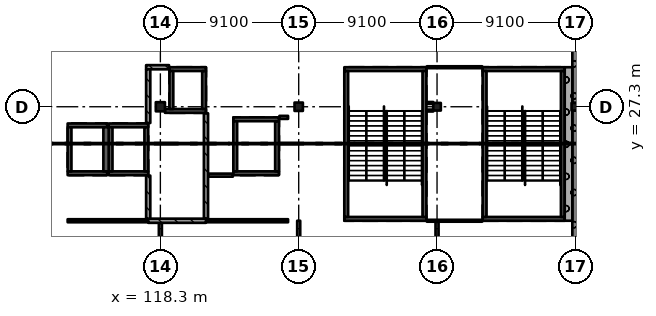
"""IFC4 building model, lengths in metres.
Left out: names, types, materials, properties, quantities, classifications, styles, units other than length and angle.
Written with IfcOpenShell. Run it as: python <this file> out.ifc"""

import sys

from ifc_helpers import new_model, si_unit, direction, frame, frame_2d, origin, origin_2d, place, context, subcontext, project, spatial, rectangle, extrude, element, fill, save


model = new_model("IFC4")
c1 = context("Model", 3, precision=1e-05, world=origin(), true_north=direction((0.0, 1.0)))
c2 = subcontext(c1, "Body", "Model", "MODEL_VIEW")
j1 = project(units=[si_unit("LENGTHUNIT", "METRE"), si_unit("PLANEANGLEUNIT", "RADIAN")], contexts=[c1])
p1 = place(None, origin())
s1 = spatial("IfcSite", under=j1, at=p1, CompositionType="ELEMENT")
p2 = place(p1, origin())
s2 = spatial("IfcBuilding", under=s1, at=p2, CompositionType="ELEMENT")
p3 = place(p2, frame((0.0, 0.0, 20.02)))
s3 = spatial("IfcBuildingStorey", under=s2, at=p3, CompositionType="ELEMENT", Elevation=20.02)
p4 = place(p3, frame((118.3, 27.3, 0.0), z_axis=(0.0, 0.0, 1.0), x_axis=(1.0, 0.0, 0.0)))
e1 = element("IfcColumn", 1, at=p4, inside=s3, PredefinedType="COLUMN", context=c2, shape_type="SweptSolid", body=[
    extrude(rectangle(XDim=0.6, YDim=0.6, at=origin_2d()), origin(), (0.0, 0.0, 1.0), 4.55),
])
p5 = place(p3, frame((127.4, 27.3, 0.0), z_axis=(0.0, 0.0, 1.0), x_axis=(1.0, 0.0, 0.0)))
e2 = element("IfcColumn", 2, at=p5, inside=s3, PredefinedType="COLUMN", context=c2, shape_type="SweptSolid", body=[
    extrude(rectangle(XDim=0.55, YDim=0.55, at=origin_2d()), origin(), (0.0, 0.0, 1.0), 4.55),
])
for number, where, z_axis, x_axis in (
    (3, (136.5, 27.3, 0.0), (0.0, 0.0, 1.0), (1.0, 0.0, 0.0)),
    (4, (145.6, 27.3, 0.0), (0.0, 0.0, 1.0), (1.0, 0.0, 0.0)),
):
    element("IfcColumn", number, at=place(p3, frame(where, z_axis=z_axis, x_axis=x_axis)), inside=s3, PredefinedType="COLUMN", context=c2, shape_type="SweptSolid", body=[
        extrude(rectangle(XDim=0.5, YDim=0.5, at=origin_2d()), origin(), (0.0, 0.0, 1.0), 4.55),
    ])
p6 = place(p3, frame((117.5, 22.925, 0.0), z_axis=(0.0, 0.0, 1.0), x_axis=(-1.0, 0.0, 0.0)))
e5 = element("IfcWall", 5, at=p6, inside=s3, PredefinedType="SHEAR", context=c2, shape_type="SweptSolid", body=[
    extrude(rectangle(XDim=2.6, YDim=0.25, at=frame_2d((1.3, 0.0))), origin(), (0.0, 0.0, 1.0), 4.55),
])
p7 = place(p6, frame((0.8, 0.0, 0.0)))
e6 = element("IfcOpeningElement", 6, at=p7, cuts=e5, PredefinedType="OPENING", context=c2, shape_type="SweptSolid", body=[
    extrude(rectangle(XDim=1.0, YDim=2.1, at=frame_2d((0.5, 1.05))), frame((0.0, 0.135, 0.0), z_axis=(0.0, -1.0, 0.0), x_axis=(1.0, 0.0, 0.0)), (0.0, 0.0, 1.0), 0.27),
])
p8 = place(p3, frame((117.5, 26.075, 0.0), z_axis=(0.0, 0.0, 1.0), x_axis=(-1.0, 0.0, 0.0)))
e7 = element("IfcWall", 7, at=p8, inside=s3, PredefinedType="SHEAR", context=c2, shape_type="SweptSolid", body=[
    extrude(rectangle(XDim=2.6, YDim=0.25, at=frame_2d((1.3, 0.0))), origin(), (0.0, 0.0, 1.0), 4.55),
])
for number, where, z_axis, x_axis in (
    (8, (115.025, 25.95, 0.0), (0.0, 0.0, 1.0), (0.0, -1.0, 0.0)),
    (9, (117.375, 25.95, 0.0), (0.0, 0.0, 1.0), (0.0, -1.0, 0.0)),
):
    element("IfcWall", number, at=place(p3, frame(where, z_axis=z_axis, x_axis=x_axis)), inside=s3, PredefinedType="SHEAR", context=c2, shape_type="SweptSolid", body=[
        extrude(rectangle(XDim=2.9, YDim=0.25, at=frame_2d((1.45, 0.0))), origin(), (0.0, 0.0, 1.0), 4.55),
    ])
p9 = place(p3, frame((114.8, 22.925, 0.0), z_axis=(0.0, 0.0, 1.0), x_axis=(-1.0, 0.0, 0.0)))
e10 = element("IfcWall", 10, at=p9, inside=s3, PredefinedType="SHEAR", context=c2, shape_type="SweptSolid", body=[
    extrude(rectangle(XDim=2.6, YDim=0.25, at=frame_2d((1.3, 0.0))), origin(), (0.0, 0.0, 1.0), 4.55),
])
p10 = place(p9, frame((0.8, 0.0, 0.0)))
e11 = element("IfcOpeningElement", 11, at=p10, cuts=e10, PredefinedType="OPENING", context=c2, shape_type="SweptSolid", body=[
    extrude(rectangle(XDim=1.0, YDim=2.1, at=frame_2d((0.5, 1.05))), frame((0.0, 0.135, 0.0), z_axis=(0.0, -1.0, 0.0), x_axis=(1.0, 0.0, 0.0)), (0.0, 0.0, 1.0), 0.27),
])
p11 = place(p3, frame((114.8, 26.075, 0.0), z_axis=(0.0, 0.0, 1.0), x_axis=(-1.0, 0.0, 0.0)))
e12 = element("IfcWall", 12, at=p11, inside=s3, PredefinedType="SHEAR", context=c2, shape_type="SweptSolid", body=[
    extrude(rectangle(XDim=2.6, YDim=0.25, at=frame_2d((1.3, 0.0))), origin(), (0.0, 0.0, 1.0), 4.55),
])
p12 = place(p3, frame((112.325, 25.95, 0.0), z_axis=(0.0, 0.0, 1.0), x_axis=(0.0, -1.0, 0.0)))
e13 = element("IfcWall", 13, at=p12, inside=s3, PredefinedType="SHEAR", context=c2, shape_type="SweptSolid", body=[
    extrude(rectangle(XDim=2.9, YDim=0.25, at=frame_2d((1.45, 0.0))), origin(), (0.0, 0.0, 1.0), 4.55),
])
p13 = place(p3, frame((114.725, 25.95, 0.0), z_axis=(0.0, 0.0, 1.0), x_axis=(0.0, -1.0, 0.0)))
e14 = element("IfcWall", 14, at=p13, inside=s3, PredefinedType="SHEAR", context=c2, shape_type="SweptSolid", body=[
    extrude(rectangle(XDim=2.9, YDim=0.35, at=frame_2d((1.45, 0.0))), origin(), (0.0, 0.0, 1.0), 4.55),
])
p14 = place(p3, frame((121.3, 27.025, 0.0), z_axis=(0.0, 0.0, 1.0), x_axis=(-1.0, 0.0, 0.0)))
e15 = element("IfcWall", 15, at=p14, inside=s3, PredefinedType="SHEAR", context=c2, shape_type="SweptSolid", body=[
    extrude(rectangle(XDim=2.7, YDim=0.25, at=frame_2d((1.35, 0.0))), origin(), (0.0, 0.0, 1.0), 4.55),
])
p15 = place(p3, frame((121.3, 29.775, 0.0), z_axis=(0.0, 0.0, 1.0), x_axis=(-1.0, 0.0, 0.0)))
e16 = element("IfcWall", 16, at=p15, inside=s3, PredefinedType="SHEAR", context=c2, shape_type="SweptSolid", body=[
    extrude(rectangle(XDim=2.4, YDim=0.25, at=frame_2d((1.2, 0.0))), origin(), (0.0, 0.0, 1.0), 4.55),
])
p16 = place(p3, frame((119.025, 29.65, 0.0), z_axis=(0.0, 0.0, 1.0), x_axis=(0.0, -1.0, 0.0)))
e17 = element("IfcWall", 17, at=p16, inside=s3, PredefinedType="SHEAR", context=c2, shape_type="SweptSolid", body=[
    extrude(rectangle(XDim=2.5, YDim=0.25, at=frame_2d((1.25, 0.0))), origin(), (0.0, 0.0, 1.0), 4.55),
])
p17 = place(p3, frame((121.175, 29.65, 0.0), z_axis=(0.0, 0.0, 1.0), x_axis=(0.0, -1.0, 0.0)))
e18 = element("IfcWall", 18, at=p17, inside=s3, PredefinedType="SHEAR", context=c2, shape_type="SweptSolid", body=[
    extrude(rectangle(XDim=2.5, YDim=0.25, at=frame_2d((1.25, 0.0))), origin(), (0.0, 0.0, 1.0), 4.55),
])
p18 = place(p17, frame((0.9, 0.0, 0.0)))
e19 = element("IfcOpeningElement", 19, at=p18, cuts=e18, PredefinedType="OPENING", context=c2, shape_type="SweptSolid", body=[
    extrude(rectangle(XDim=0.7, YDim=2.1, at=frame_2d((0.35, 1.05))), frame((0.0, 0.135, 0.0), z_axis=(0.0, -1.0, 0.0), x_axis=(1.0, 0.0, 0.0)), (0.0, 0.0, 1.0), 0.27),
])
p19 = place(p3, frame((126.1, 22.925, 0.0), z_axis=(0.0, 0.0, 1.0), x_axis=(-1.0, 0.0, 0.0)))
e20 = element("IfcWall", 20, at=p19, inside=s3, PredefinedType="SHEAR", context=c2, shape_type="SweptSolid", body=[
    extrude(rectangle(XDim=3.0, YDim=0.25, at=frame_2d((1.5, 0.0))), origin(), (0.0, 0.0, 1.0), 4.55),
])
p20 = place(p19, frame((0.95, 0.0, 0.0)))
e21 = element("IfcOpeningElement", 21, at=p20, cuts=e20, PredefinedType="OPENING", context=c2, shape_type="SweptSolid", body=[
    extrude(rectangle(XDim=1.1, YDim=2.1, at=frame_2d((0.55, 1.05))), frame((0.0, 0.135, 0.0), z_axis=(0.0, -1.0, 0.0), x_axis=(1.0, 0.0, 0.0)), (0.0, 0.0, 1.0), 0.27),
])
p21 = place(p3, frame((126.1, 26.475, 0.0), z_axis=(0.0, 0.0, 1.0), x_axis=(-1.0, 0.0, 0.0)))
e22 = element("IfcWall", 22, at=p21, inside=s3, PredefinedType="SHEAR", context=c2, shape_type="SweptSolid", body=[
    extrude(rectangle(XDim=3.0, YDim=0.25, at=frame_2d((1.5, 0.0))), origin(), (0.0, 0.0, 1.0), 4.55),
])
for number, where, z_axis, x_axis in (
    (23, (123.225, 26.35, 0.0), (0.0, 0.0, 1.0), (0.0, -1.0, 0.0)),
    (24, (125.975, 26.35, 0.0), (0.0, 0.0, 1.0), (0.0, -1.0, 0.0)),
):
    element("IfcWall", number, at=place(p3, frame(where, z_axis=z_axis, x_axis=x_axis)), inside=s3, PredefinedType="SHEAR", context=c2, shape_type="SweptSolid", body=[
        extrude(rectangle(XDim=3.3, YDim=0.25, at=frame_2d((1.65, 0.0))), origin(), (0.0, 0.0, 1.0), 4.55),
    ])
p22 = place(p3, frame((144.9, 19.925, 0.0), z_axis=(0.0, 0.0, 1.0), x_axis=(-1.0, 0.0, 0.0)))
e25 = element("IfcWall", 25, at=p22, inside=s3, PredefinedType="SHEAR", context=c2, shape_type="SweptSolid", body=[
    extrude(rectangle(XDim=5.4, YDim=0.25, at=frame_2d((2.7, 0.0))), origin(), (0.0, 0.0, 1.0), 4.55),
])
p23 = place(p22, frame((1.5, 0.0, 0.0)))
e26 = element("IfcOpeningElement", 26, at=p23, cuts=e25, PredefinedType="OPENING", context=c2, shape_type="SweptSolid", body=[
    extrude(rectangle(XDim=2.4, YDim=2.1, at=frame_2d((1.2, 1.05))), frame((0.0, 0.135, 0.0), z_axis=(0.0, -1.0, 0.0), x_axis=(1.0, 0.0, 0.0)), (0.0, 0.0, 1.0), 0.27),
])
p24 = place(p3, frame((144.9, 29.775, 0.0), z_axis=(0.0, 0.0, 1.0), x_axis=(-1.0, 0.0, 0.0)))
e27 = element("IfcWall", 27, at=p24, inside=s3, PredefinedType="SHEAR", context=c2, shape_type="SweptSolid", body=[
    extrude(rectangle(XDim=5.4, YDim=0.25, at=frame_2d((2.7, 0.0))), origin(), (0.0, 0.0, 1.0), 4.55),
])
for number, where, z_axis, x_axis in (
    (28, (139.625, 29.65, 0.0), (0.0, 0.0, 1.0), (0.0, -1.0, 0.0)),
    (29, (144.775, 29.65, 0.0), (0.0, 0.0, 1.0), (0.0, -1.0, 0.0)),
):
    element("IfcWall", number, at=place(p3, frame(where, z_axis=z_axis, x_axis=x_axis)), inside=s3, PredefinedType="SHEAR", context=c2, shape_type="SweptSolid", body=[
        extrude(rectangle(XDim=9.6, YDim=0.25, at=frame_2d((4.8, 0.0))), origin(), (0.0, 0.0, 1.0), 4.55),
    ])
p25 = place(p3, frame((135.8, 19.925, 0.0), z_axis=(0.0, 0.0, 1.0), x_axis=(-1.0, 0.0, 0.0)))
e30 = element("IfcWall", 30, at=p25, inside=s3, PredefinedType="SHEAR", context=c2, shape_type="SweptSolid", body=[
    extrude(rectangle(XDim=5.4, YDim=0.25, at=frame_2d((2.7, 0.0))), origin(), (0.0, 0.0, 1.0), 4.55),
])
p26 = place(p25, frame((1.5, 0.0, 0.0)))
e31 = element("IfcOpeningElement", 31, at=p26, cuts=e30, PredefinedType="OPENING", context=c2, shape_type="SweptSolid", body=[
    extrude(rectangle(XDim=2.4, YDim=2.1, at=frame_2d((1.2, 1.05))), frame((0.0, 0.135, 0.0), z_axis=(0.0, -1.0, 0.0), x_axis=(1.0, 0.0, 0.0)), (0.0, 0.0, 1.0), 0.27),
])
p27 = place(p3, frame((135.8, 29.775, 0.0), z_axis=(0.0, 0.0, 1.0), x_axis=(-1.0, 0.0, 0.0)))
e32 = element("IfcWall", 32, at=p27, inside=s3, PredefinedType="SHEAR", context=c2, shape_type="SweptSolid", body=[
    extrude(rectangle(XDim=5.4, YDim=0.25, at=frame_2d((2.7, 0.0))), origin(), (0.0, 0.0, 1.0), 4.55),
])
for number, where, z_axis, x_axis in (
    (33, (130.525, 29.65, 0.0), (0.0, 0.0, 1.0), (0.0, -1.0, 0.0)),
    (34, (135.675, 29.65, 0.0), (0.0, 0.0, 1.0), (0.0, -1.0, 0.0)),
):
    element("IfcWall", number, at=place(p3, frame(where, z_axis=z_axis, x_axis=x_axis)), inside=s3, PredefinedType="SHEAR", context=c2, shape_type="SweptSolid", body=[
        extrude(rectangle(XDim=9.6, YDim=0.25, at=frame_2d((4.8, 0.0))), origin(), (0.0, 0.0, 1.0), 4.55),
    ])
p28 = place(p3, frame((145.575, 18.45, 0.0), z_axis=(0.0, 0.0, 1.0), x_axis=(0.0, 1.0, 0.0)))
e35 = element("IfcWall", 35, at=p28, inside=s3, PredefinedType="SOLIDWALL", context=c2, shape_type="SweptSolid", body=[
    extrude(rectangle(XDim=8.6, YDim=0.35, at=frame_2d((4.3, 0.0))), origin(), (0.0, 0.0, 1.0), 3.5),
])
p29 = place(p3, frame((145.575, 27.55, 0.0), z_axis=(0.0, 0.0, 1.0), x_axis=(0.0, 1.0, 0.0)))
e36 = element("IfcWall", 36, at=p29, inside=s3, PredefinedType="SOLIDWALL", context=c2, shape_type="SweptSolid", body=[
    extrude(rectangle(XDim=8.6, YDim=0.35, at=frame_2d((4.3, 0.0))), origin(), (0.0, 0.0, 1.0), 3.5),
])
p30 = place(p3, frame((145.15, 19.8, 0.0), z_axis=(0.0, 0.0, 1.0), x_axis=(0.0, 1.0, 0.0)))
e37 = element("IfcWall", 37, at=p30, inside=s3, PredefinedType="SOLIDWALL", context=c2, shape_type="SweptSolid", body=[
    extrude(rectangle(XDim=10.1, YDim=0.5, at=frame_2d((5.05, 0.0))), origin(), (0.0, 0.0, 1.0), 4.55),
])
p31 = place(p3, frame((112.2, 19.8, 0.0), z_axis=(0.0, 0.0, 1.0), x_axis=(1.0, 0.0, 0.0)))
e38 = element("IfcWall", 38, at=p31, inside=s3, PredefinedType="PARTITIONING", context=c2, shape_type="SweptSolid", body=[
    extrude(rectangle(XDim=5.3, YDim=0.2, at=frame_2d((2.65, 0.0))), origin(), (0.0, 0.0, 1.0), 4.25),
])
p32 = place(p31, frame((1.75, 0.0, 0.0)))
e39 = element("IfcOpeningElement", 39, at=p32, cuts=e38, PredefinedType="OPENING", context=c2, shape_type="SweptSolid", body=[
    extrude(rectangle(XDim=1.8, YDim=2.4, at=frame_2d((0.9, 1.2))), frame((0.0, 0.11, 0.0), z_axis=(0.0, -1.0, 0.0), x_axis=(1.0, 0.0, 0.0)), (0.0, 0.0, 1.0), 0.22),
])
p33 = place(p3, frame((117.363, 29.9, 0.0), z_axis=(0.0, 0.0, 1.0), x_axis=(1.0, 0.0, 0.0)))
e40 = element("IfcWall", 40, at=p33, inside=s3, PredefinedType="SOLIDWALL", context=c2, shape_type="SweptSolid", body=[
    extrude(rectangle(XDim=1.508, YDim=0.275, at=frame_2d((0.754, 0.0))), origin(), (0.0, 0.0, 1.0), 4.25),
])
p34 = place(p3, frame((117.5, 19.8, 0.0), z_axis=(0.0, 0.0, 1.0), x_axis=(1.0, 0.0, 0.0)))
e41 = element("IfcWall", 41, at=p34, inside=s3, PredefinedType="SOLIDWALL", context=c2, shape_type="SweptSolid", body=[
    extrude(rectangle(XDim=3.8, YDim=0.275, at=frame_2d((1.9, 0.0))), origin(), (0.0, 0.0, 1.0), 4.25),
])
p35 = place(p34, frame((1.75, 0.0, 0.0)))
e42 = element("IfcOpeningElement", 42, at=p35, cuts=e41, PredefinedType="OPENING", context=c2, shape_type="SweptSolid", body=[
    extrude(rectangle(XDim=1.2, YDim=2.4, at=frame_2d((0.6, 1.2))), frame((0.0, 0.147, 0.0), z_axis=(0.0, -1.0, 0.0), x_axis=(1.0, 0.0, 0.0)), (0.0, 0.0, 1.0), 0.295),
])
p36 = place(p3, frame((117.5, 19.938, 0.0), z_axis=(0.0, 0.0, 1.0), x_axis=(0.0, 1.0, 0.0)))
e43 = element("IfcWall", 43, at=p36, inside=s3, PredefinedType="SOLIDWALL", context=c2, shape_type="SweptSolid", body=[
    extrude(rectangle(XDim=2.833, YDim=0.275, at=frame_2d((1.416, 0.0))), origin(), (0.0, 0.0, 1.0), 4.25),
])
p37 = place(p3, frame((117.5, 26.23, 0.0), z_axis=(0.0, 0.0, 1.0), x_axis=(0.0, 1.0, 0.0)))
e44 = element("IfcWall", 44, at=p37, inside=s3, PredefinedType="SOLIDWALL", context=c2, shape_type="SweptSolid", body=[
    extrude(rectangle(XDim=3.532, YDim=0.275, at=frame_2d((1.766, 0.0))), origin(), (0.0, 0.0, 1.0), 4.25),
])
p38 = place(p3, frame((118.3, 18.5, 0.0), z_axis=(0.0, 0.0, 1.0), x_axis=(0.0, 1.0, 0.0)))
e45 = element("IfcWall", 45, at=p38, inside=s3, PredefinedType="PARTITIONING", context=c2, shape_type="SweptSolid", body=[
    extrude(rectangle(XDim=1.163, YDim=0.2, at=frame_2d((0.581, 0.0))), origin(), (0.0, 0.0, 1.0), 3.5),
])
p39 = place(p3, frame((121.3, 19.8, 0.0), z_axis=(0.0, 0.0, 1.0), x_axis=(1.0, 0.0, 0.0)))
e46 = element("IfcWall", 46, at=p39, inside=s3, PredefinedType="PARTITIONING", context=c2, shape_type="SweptSolid", body=[
    extrude(rectangle(XDim=5.4, YDim=0.2, at=frame_2d((2.7, 0.0))), origin(), (0.0, 0.0, 1.0), 4.25),
])
p40 = place(p39, frame((1.85, 0.0, 0.0)))
e47 = element("IfcOpeningElement", 47, at=p40, cuts=e46, PredefinedType="OPENING", context=c2, shape_type="SweptSolid", body=[
    extrude(rectangle(XDim=1.8, YDim=2.4, at=frame_2d((0.9, 1.2))), frame((0.0, 0.11, 0.0), z_axis=(0.0, -1.0, 0.0), x_axis=(1.0, 0.0, 0.0)), (0.0, 0.0, 1.0), 0.22),
])
p41 = place(p3, frame((121.3, 19.938, 0.0), z_axis=(0.0, 0.0, 1.0), x_axis=(0.0, 1.0, 0.0)))
e48 = element("IfcWall", 48, at=p41, inside=s3, PredefinedType="SOLIDWALL", context=c2, shape_type="SweptSolid", body=[
    extrude(rectangle(XDim=6.933, YDim=0.275, at=frame_2d((3.466, 0.0))), origin(), (0.0, 0.0, 1.0), 4.25),
])
p42 = place(p3, frame((121.438, 22.8, 0.0), z_axis=(0.0, 0.0, 1.0), x_axis=(1.0, 0.0, 0.0)))
e49 = element("IfcWall", 49, at=p42, inside=s3, PredefinedType="PARTITIONING", context=c2, shape_type="SweptSolid", body=[
    extrude(rectangle(XDim=1.633, YDim=0.2, at=frame_2d((0.816, 0.0))), origin(), (0.0, 0.0, 1.0), 4.25),
])
p43 = place(p3, frame((126.13, 26.6, 0.0), z_axis=(0.0, 0.0, 1.0), x_axis=(1.0, 0.0, 0.0)))
e50 = element("IfcWall", 50, at=p43, inside=s3, PredefinedType="PARTITIONING", context=c2, shape_type="SweptSolid", body=[
    extrude(rectangle(XDim=0.57, YDim=0.2, at=frame_2d((0.285, 0.0))), origin(), (0.0, 0.0, 1.0), 4.25),
])
p44 = place(p3, frame((127.4, 18.5, 0.0), z_axis=(0.0, 0.0, 1.0), x_axis=(0.0, 1.0, 0.0)))
e51 = element("IfcWall", 51, at=p44, inside=s3, PredefinedType="PARTITIONING", context=c2, shape_type="SweptSolid", body=[
    extrude(rectangle(XDim=1.3, YDim=0.2, at=frame_2d((0.65, 0.0))), origin(), (0.0, 0.0, 1.0), 3.5),
])
p45 = place(p3, frame((135.83, 19.8, 0.0), z_axis=(0.0, 0.0, 1.0), x_axis=(1.0, 0.0, 0.0)))
e52 = element("IfcWall", 52, at=p45, inside=s3, PredefinedType="PARTITIONING", context=c2, shape_type="SweptSolid", body=[
    extrude(rectangle(XDim=3.64, YDim=0.125, at=frame_2d((1.82, 0.0))), origin(), (0.0, 0.0, 1.0), 4.25),
])
p46 = place(p45, frame((1.72, 0.0, 0.0)))
e53 = element("IfcOpeningElement", 53, at=p46, cuts=e52, PredefinedType="OPENING", context=c2, shape_type="SweptSolid", body=[
    extrude(rectangle(XDim=0.9, YDim=2.1, at=frame_2d((0.45, 1.05))), frame((0.0, 0.073, 0.0), z_axis=(0.0, -1.0, 0.0), x_axis=(1.0, 0.0, 0.0)), (0.0, 0.0, 1.0), 0.145),
])
p47 = place(p3, frame((135.83, 27.05, 0.0), z_axis=(0.0, 0.0, 1.0), x_axis=(1.0, 0.0, 0.0)))
e54 = element("IfcWall", 54, at=p47, inside=s3, PredefinedType="PARTITIONING", context=c2, shape_type="SweptSolid", body=[
    extrude(rectangle(XDim=0.42, YDim=0.125, at=frame_2d((0.21, 0.0))), origin(), (0.0, 0.0, 1.0), 4.25),
])
p48 = place(p3, frame((135.83, 29.9, 0.0), z_axis=(0.0, 0.0, 1.0), x_axis=(1.0, 0.0, 0.0)))
e55 = element("IfcWall", 55, at=p48, inside=s3, PredefinedType="PARTITIONING", context=c2, shape_type="SweptSolid", body=[
    extrude(rectangle(XDim=3.64, YDim=0.125, at=frame_2d((1.82, 0.0))), origin(), (0.0, 0.0, 1.0), 4.25),
])
p49 = place(p3, frame((136.25, 27.55, 0.0), z_axis=(0.0, 0.0, 1.0), x_axis=(-1.0, 0.0, 0.0)))
e56 = element("IfcWall", 56, at=p49, inside=s3, PredefinedType="PARTITIONING", context=c2, shape_type="SweptSolid", body=[
    extrude(rectangle(XDim=0.42, YDim=0.125, at=frame_2d((0.21, 0.0))), origin(), (0.0, 0.0, 1.0), 4.25),
])
p50 = place(p3, frame((136.5, 18.475, 0.0), z_axis=(0.0, 0.0, 1.0), x_axis=(0.0, 1.0, 0.0)))
e57 = element("IfcWall", 57, at=p50, inside=s3, PredefinedType="PARTITIONING", context=c2, shape_type="SweptSolid", body=[
    extrude(rectangle(XDim=1.262, YDim=0.2, at=frame_2d((0.631, 0.0))), origin(), (0.0, 0.0, 1.0), 3.5),
])
p51 = place(p46, origin())
e58 = element("IfcDoor", 58, at=p51, inside=s3, OperationType="SINGLE_SWING_LEFT", PredefinedType="DOOR", context=c2, shape_type="SweptSolid", body=[
    extrude(rectangle(XDim=0.9, YDim=2.1, at=frame_2d((0.45, 1.05))), frame((0.0, 0.025, 0.0), z_axis=(0.0, -1.0, 0.0), x_axis=(1.0, 0.0, 0.0)), (0.0, 0.0, 1.0), 0.05),
])
fill(e53, e58)
p52 = place(p35, origin())
e59 = element("IfcDoor", 59, at=p52, inside=s3, OperationType="SINGLE_SWING_LEFT", PredefinedType="DOOR", context=c2, shape_type="SweptSolid", body=[
    extrude(rectangle(XDim=1.2, YDim=2.4, at=frame_2d((0.6, 1.2))), frame((0.0, 0.025, 0.0), z_axis=(0.0, -1.0, 0.0), x_axis=(1.0, 0.0, 0.0)), (0.0, 0.0, 1.0), 0.05),
])
fill(e42, e59)
p53 = place(p40, origin())
e60 = element("IfcDoor", 60, at=p53, inside=s3, OperationType="DOUBLE_DOOR_SINGLE_SWING", PredefinedType="DOOR", context=c2, shape_type="SweptSolid", body=[
    extrude(rectangle(XDim=1.8, YDim=2.4, at=frame_2d((0.9, 1.2))), frame((0.0, 0.025, 0.0), z_axis=(0.0, -1.0, 0.0), x_axis=(1.0, 0.0, 0.0)), (0.0, 0.0, 1.0), 0.05),
])
fill(e47, e60)
p54 = place(p32, origin())
e61 = element("IfcDoor", 61, at=p54, inside=s3, OperationType="DOUBLE_DOOR_SINGLE_SWING", PredefinedType="DOOR", context=c2, shape_type="SweptSolid", body=[
    extrude(rectangle(XDim=1.8, YDim=2.4, at=frame_2d((0.9, 1.2))), frame((0.0, 0.025, 0.0), z_axis=(0.0, -1.0, 0.0), x_axis=(1.0, 0.0, 0.0)), (0.0, 0.0, 1.0), 0.05),
])
fill(e39, e61)
p55 = place(p18, origin())
e62 = element("IfcDoor", 62, at=p55, inside=s3, OperationType="SINGLE_SWING_RIGHT", PredefinedType="DOOR", context=c2, shape_type="SweptSolid", body=[
    extrude(rectangle(XDim=0.7, YDim=2.1, at=frame_2d((0.35, 1.05))), frame((0.0, 0.025, 0.0), z_axis=(0.0, -1.0, 0.0), x_axis=(1.0, 0.0, 0.0)), (0.0, 0.0, 1.0), 0.05),
])
fill(e19, e62)
p56 = place(p23, origin())
e63 = element("IfcDoor", 63, at=p56, inside=s3, OperationType="DOUBLE_DOOR_SINGLE_SWING", PredefinedType="DOOR", context=c2, shape_type="SweptSolid", body=[
    extrude(rectangle(XDim=2.4, YDim=2.1, at=frame_2d((1.2, 1.05))), frame((0.0, 0.025, 0.0), z_axis=(0.0, -1.0, 0.0), x_axis=(1.0, 0.0, 0.0)), (0.0, 0.0, 1.0), 0.05),
])
fill(e26, e63)
p57 = place(p26, origin())
e64 = element("IfcDoor", 64, at=p57, inside=s3, OperationType="DOUBLE_DOOR_SINGLE_SWING", PredefinedType="DOOR", context=c2, shape_type="SweptSolid", body=[
    extrude(rectangle(XDim=2.4, YDim=2.1, at=frame_2d((1.2, 1.05))), frame((0.0, 0.025, 0.0), z_axis=(0.0, -1.0, 0.0), x_axis=(1.0, 0.0, 0.0)), (0.0, 0.0, 1.0), 0.05),
])
fill(e31, e64)
p58 = place(p7, origin())
e65 = element("IfcDoor", 65, at=p58, inside=s3, OperationType="DOUBLE_DOOR_SLIDING", PredefinedType="DOOR", context=c2, shape_type="SweptSolid", body=[
    extrude(rectangle(XDim=1.0, YDim=2.1, at=frame_2d((0.5, 1.05))), frame((0.0, 0.025, 0.0), z_axis=(0.0, -1.0, 0.0), x_axis=(1.0, 0.0, 0.0)), (0.0, 0.0, 1.0), 0.05),
])
fill(e6, e65)
p59 = place(p10, origin())
e66 = element("IfcDoor", 66, at=p59, inside=s3, OperationType="DOUBLE_DOOR_SLIDING", PredefinedType="DOOR", context=c2, shape_type="SweptSolid", body=[
    extrude(rectangle(XDim=1.0, YDim=2.1, at=frame_2d((0.5, 1.05))), frame((0.0, 0.025, 0.0), z_axis=(0.0, -1.0, 0.0), x_axis=(1.0, 0.0, 0.0)), (0.0, 0.0, 1.0), 0.05),
])
fill(e11, e66)
p60 = place(p20, origin())
e67 = element("IfcDoor", 67, at=p60, inside=s3, OperationType="DOUBLE_DOOR_SLIDING", PredefinedType="DOOR", context=c2, shape_type="SweptSolid", body=[
    extrude(rectangle(XDim=1.1, YDim=2.1, at=frame_2d((0.55, 1.05))), frame((0.0, 0.025, 0.0), z_axis=(0.0, -1.0, 0.0), x_axis=(1.0, 0.0, 0.0)), (0.0, 0.0, 1.0), 0.05),
])
fill(e21, e67)
save(model, sys.argv[1])
